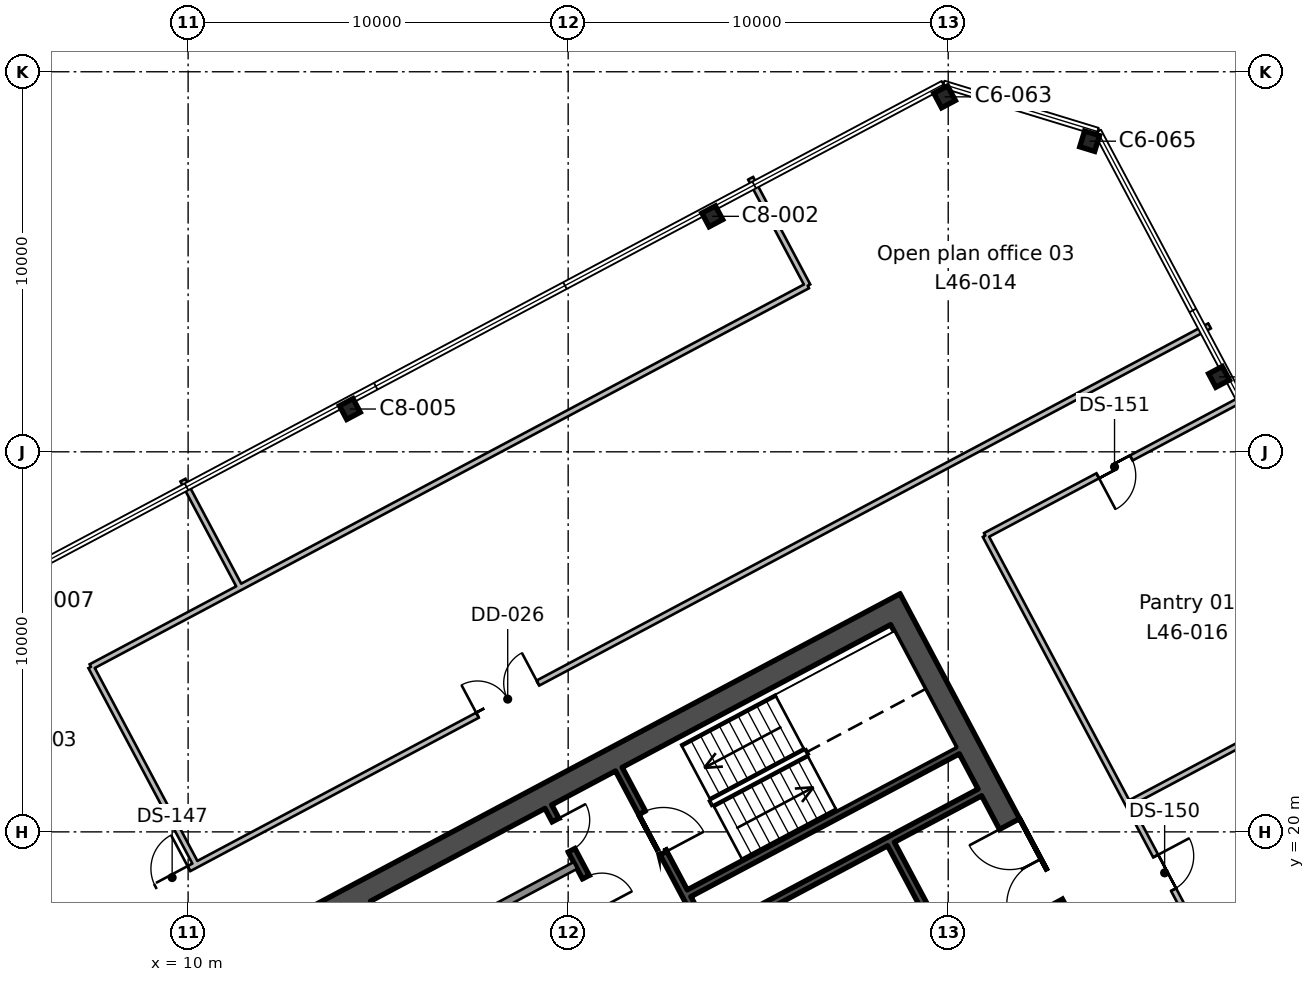
"""IFC4 building model, lengths in metres.
Left out: names, types, materials, properties, quantities, classifications, styles, units other than length and angle.
Written with IfcOpenShell. Run it as: python <this file> out.ifc"""

import sys

from ifc_helpers import new_model, si_unit, direction, frame, frame_2d, origin, origin_2d, place, context, subcontext, project, spatial, rectangle, i_section, extrude, element, fill, save


model = new_model("IFC4")
c1 = context("Model", 3, precision=1e-05, world=origin(), true_north=direction((0.0, 1.0)))
c2 = subcontext(c1, "Body", "Model", "MODEL_VIEW")
j1 = project(units=[si_unit("LENGTHUNIT", "METRE"), si_unit("PLANEANGLEUNIT", "RADIAN")], contexts=[c1])
p1 = place(None, origin())
s1 = spatial("IfcSite", under=j1, at=p1, CompositionType="ELEMENT")
p2 = place(p1, origin())
s2 = spatial("IfcBuilding", under=s1, at=p2, CompositionType="ELEMENT")
p3 = place(p2, frame((0.0, 0.0, 213.0)))
s3 = spatial("IfcBuildingStorey", under=s2, at=p3, CompositionType="ELEMENT", Elevation=213.0)
for number, where, z_axis, x_axis in (
    (1, (14.256, 31.126, 0.0), (0.0, 0.0, 1.0), (-0.883, -0.469, 0.0)),
    (2, (37.126, 31.972, 0.0), (0.0, 0.0, 1.0), (-0.469, 0.883, 0.0)),
    (3, (23.792, 36.196, 0.0), (0.0, 0.0, 1.0), (-0.883, -0.469, 0.0)),
):
    element("IfcColumn", number, at=place(p3, frame(where, z_axis=z_axis, x_axis=x_axis)), inside=s3, PredefinedType="COLUMN", context=c2, shape_type="SweptSolid", body=[
        extrude(i_section(OverallWidth=0.404, OverallDepth=0.406, WebThickness=0.027, FlangeThickness=0.044, FilletRadius=0.015, at=origin_2d()), origin(), (0.0, 0.0, 1.0), 3.9),
    ])
for number, where, z_axis, x_axis in (
    (4, (33.721, 38.173, 0.0), (0.0, 0.0, 1.0), (-0.956, 0.292, 0.0)),
    (5, (29.905, 39.34, 0.0), (0.0, 0.0, 1.0), (-0.883, -0.469, 0.0)),
):
    element("IfcColumn", number, at=place(p3, frame(where, z_axis=z_axis, x_axis=x_axis)), inside=s3, PredefinedType="COLUMN", context=c2, shape_type="SweptSolid", body=[
        extrude(i_section(OverallWidth=0.412, OverallDepth=0.434, WebThickness=0.036, FlangeThickness=0.057, FilletRadius=0.015, at=origin_2d()), origin(), (0.0, 0.0, 1.0), 3.9),
    ])
p4 = place(p3, frame((37.576, 8.994, 0.0), z_axis=(0.0, 0.0, 1.0), x_axis=(-0.469478769487, 0.88294376095, 0.0)))
e6 = element("IfcWall", 6, at=p4, inside=s3, PredefinedType="SHEAR", context=c2, shape_type="SweptSolid", body=[
    extrude(rectangle(XDim=19.4, YDim=0.6, at=frame_2d((9.7, 0.0))), origin(), (0.0, 0.0, 1.0), 3.9),
])
p5 = place(p4, frame((10.3, 0.0, 0.0)))
e7 = element("IfcOpeningElement", 7, at=p5, cuts=e6, PredefinedType="OPENING", context=c2, shape_type="SweptSolid", body=[
    extrude(rectangle(XDim=2.4, YDim=2.4, at=frame_2d((1.2, 1.2))), frame((0.0, 0.31, 0.0), z_axis=(0.0, -1.0, 0.0), x_axis=(1.0, 0.0, 0.0)), (0.0, 0.0, 1.0), 0.62),
])
p6 = place(p3, frame((10.509, 16.234, 0.0), z_axis=(0.0, 0.0, 1.0), x_axis=(0.88295010195, 0.469466843842, 0.0)))
e8 = element("IfcWall", 8, at=p6, inside=s3, PredefinedType="SHEAR", context=c2, shape_type="SweptSolid", body=[
    extrude(rectangle(XDim=20.2, YDim=0.6, at=frame_2d((10.1, 0.0))), origin(), (0.0, 0.0, 1.0), 3.9),
])
p7 = place(p3, frame((18.138, 11.683, 0.0), z_axis=(0.0, 0.0, 1.0), x_axis=(-0.469480409012, 0.88294288918, 0.0)))
e9 = element("IfcWall", 9, at=p7, inside=s3, PredefinedType="SHEAR", context=c2, shape_type="SweptSolid", body=[
    extrude(rectangle(XDim=7.3, YDim=0.2, at=frame_2d((3.65, 0.0))), origin(), (0.0, 0.0, 1.0), 3.9),
])
p8 = place(p3, frame((22.906, 14.218, 0.0), z_axis=(0.0, 0.0, 1.0), x_axis=(-0.469480409012, 0.88294288918, 0.0)))
e10 = element("IfcWall", 10, at=p8, inside=s3, PredefinedType="SHEAR", context=c2, shape_type="SweptSolid", body=[
    extrude(rectangle(XDim=7.3, YDim=0.2, at=frame_2d((3.65, 0.0))), origin(), (0.0, 0.0, 1.0), 3.9),
])
p9 = place(p8, frame((2.65, 0.0, 0.0)))
e11 = element("IfcOpeningElement", 11, at=p9, cuts=e10, PredefinedType="OPENING", context=c2, shape_type="SweptSolid", body=[
    extrude(rectangle(XDim=0.9, YDim=2.1, at=frame_2d((0.45, 1.05))), frame((0.0, 0.11, 0.0), z_axis=(0.0, -1.0, 0.0), x_axis=(1.0, 0.0, 0.0)), (0.0, 0.0, 1.0), 0.22),
])
p10 = place(p8, frame((4.3, 0.0, 0.0)))
e12 = element("IfcOpeningElement", 12, at=p10, cuts=e10, PredefinedType="OPENING", context=c2, shape_type="SweptSolid", body=[
    extrude(rectangle(XDim=0.9, YDim=2.1, at=frame_2d((0.45, 1.05))), frame((0.0, 0.11, 0.0), z_axis=(0.0, -1.0, 0.0), x_axis=(1.0, 0.0, 0.0)), (0.0, 0.0, 1.0), 0.22),
])
p11 = place(p8, frame((6.0, 0.0, 0.0)))
e13 = element("IfcOpeningElement", 13, at=p11, cuts=e10, PredefinedType="OPENING", context=c2, shape_type="SweptSolid", body=[
    extrude(rectangle(XDim=0.9, YDim=2.1, at=frame_2d((0.45, 1.05))), frame((0.0, 0.11, 0.0), z_axis=(0.0, -1.0, 0.0), x_axis=(1.0, 0.0, 0.0)), (0.0, 0.0, 1.0), 0.22),
])
p12 = place(p3, frame((24.76, 15.204, 0.0), z_axis=(0.0, 0.0, 1.0), x_axis=(-0.469494272526, 0.882935517501, 0.0)))
e14 = element("IfcWall", 14, at=p12, inside=s3, PredefinedType="SHEAR", context=c2, shape_type="SweptSolid", body=[
    extrude(rectangle(XDim=7.3, YDim=0.2, at=frame_2d((3.65, 0.0))), origin(), (0.0, 0.0, 1.0), 3.9),
])
p13 = place(p12, frame((4.8, 0.0, 0.0)))
e15 = element("IfcOpeningElement", 15, at=p13, cuts=e14, PredefinedType="OPENING", context=c2, shape_type="SweptSolid", body=[
    extrude(rectangle(XDim=1.2, YDim=2.1, at=frame_2d((0.6, 1.05))), frame((0.0, 0.11, 0.0), z_axis=(0.0, -1.0, 0.0), x_axis=(1.0, 0.0, 0.0)), (0.0, 0.0, 1.0), 0.22),
])
p14 = place(p3, frame((29.528, 17.739, 0.0), z_axis=(0.0, 0.0, 1.0), x_axis=(-0.469401318492, 0.882984938828, 0.0)))
e16 = element("IfcWall", 16, at=p14, inside=s3, PredefinedType="SHEAR", context=c2, shape_type="SweptSolid", body=[
    extrude(rectangle(XDim=2.2, YDim=0.2, at=frame_2d((1.1, 0.0))), origin(), (0.0, 0.0, 1.0), 3.9),
])
p15 = place(p3, frame((23.769, 17.282, 0.0), z_axis=(0.0, 0.0, 1.0), x_axis=(0.882940221191, 0.469485426614, 0.0)))
e17 = element("IfcWall", 17, at=p15, inside=s3, PredefinedType="SHEAR", context=c2, shape_type="SweptSolid", body=[
    extrude(rectangle(XDim=8.0, YDim=0.2, at=frame_2d((4.0, 0.0))), origin(), (0.0, 0.0, 1.0), 3.9),
])
p16 = place(p3, frame((23.182, 18.385, 0.0), z_axis=(0.0, 0.0, 1.0), x_axis=(0.88295287151, 0.469461634952, 0.0)))
e18 = element("IfcWall", 18, at=p16, inside=s3, PredefinedType="SHEAR", context=c2, shape_type="SweptSolid", body=[
    extrude(rectangle(XDim=8.0, YDim=0.2, at=frame_2d((4.0, 0.0))), origin(), (0.0, 0.0, 1.0), 3.9),
])
p17 = place(p3, frame((15.598, 16.674, 0.0), z_axis=(0.0, 0.0, 1.0), x_axis=(0.882934506056, 0.469496174655, 0.0)))
e19 = element("IfcWall", 19, at=p17, inside=s3, PredefinedType="SOLIDWALL", context=c2, shape_type="SweptSolid", body=[
    extrude(rectangle(XDim=5.2, YDim=0.2, at=frame_2d((2.6, 0.0))), origin(), (0.0, 0.0, 1.0), 3.9),
])
p18 = place(p3, frame((0.0, 13.704, 0.0), z_axis=(0.0, 0.0, 1.0), x_axis=(0.882937043325, 0.469491403036, 0.0)))
e20 = element("IfcWall", 20, at=p18, inside=s3, PredefinedType="PARTITIONING", context=c2, shape_type="SweptSolid", body=[
    extrude(rectangle(XDim=41.766, YDim=0.15, at=frame_2d((20.883, 0.0))), origin(), (0.0, 0.0, 1.0), 3.54),
])
p19 = place(p18, frame((19.95, 0.0, 0.0)))
e21 = element("IfcOpeningElement", 21, at=p19, cuts=e20, PredefinedType="OPENING", context=c2, shape_type="SweptSolid", body=[
    extrude(rectangle(XDim=1.8, YDim=2.1, at=frame_2d((0.9, 1.05))), frame((0.0, 0.085, 0.0), z_axis=(0.0, -1.0, 0.0), x_axis=(1.0, 0.0, 0.0)), (0.0, 0.0, 1.0), 0.17),
])
p20 = place(p18, frame((10.35, 0.0, 0.0)))
e22 = element("IfcOpeningElement", 22, at=p20, cuts=e20, PredefinedType="OPENING", context=c2, shape_type="SweptSolid", body=[
    extrude(rectangle(XDim=1.0, YDim=2.1, at=frame_2d((0.5, 1.05))), frame((0.0, 0.085, 0.0), z_axis=(0.0, -1.0, 0.0), x_axis=(1.0, 0.0, 0.0)), (0.0, 0.0, 1.0), 0.17),
])
p21 = place(p3, frame((9.864, 29.255, 0.0), z_axis=(0.0, 0.0, 1.0), x_axis=(0.469447181805, -0.882960556025, 0.0)))
e23 = element("IfcWall", 23, at=p21, inside=s3, PredefinedType="PARTITIONING", context=c2, shape_type="SweptSolid", body=[
    extrude(rectangle(XDim=3.199, YDim=0.15, at=frame_2d((1.6, 0.0))), origin(), (0.0, 0.0, 1.0), 3.54),
])
p22 = place(p3, frame((11.355, 26.424, 0.0), z_axis=(0.0, 0.0, 1.0), x_axis=(-0.882846627183, -0.469661402366, 0.0)))
e24 = element("IfcWall", 24, at=p22, inside=s3, PredefinedType="PARTITIONING", context=c2, shape_type="SweptSolid", body=[
    extrude(rectangle(XDim=4.431, YDim=0.15, at=frame_2d((2.215, 0.0))), origin(), (0.0, 0.0, 1.0), 3.54),
])
p23 = place(p3, frame((7.443, 24.343, 0.0), z_axis=(0.0, 0.0, 1.0), x_axis=(0.469531157267, -0.882915903332, 0.0)))
e25 = element("IfcWall", 25, at=p23, inside=s3, PredefinedType="PARTITIONING", context=c2, shape_type="SweptSolid", body=[
    extrude(rectangle(XDim=5.84, YDim=0.15, at=frame_2d((2.92, 0.0))), origin(), (0.0, 0.0, 1.0), 3.54),
])
p24 = place(p3, frame((11.355, 26.424, 0.0), z_axis=(0.0, 0.0, 1.0), x_axis=(0.882971344108, 0.469426890458, 0.0)))
e26 = element("IfcWall", 26, at=p24, inside=s3, PredefinedType="PARTITIONING", context=c2, shape_type="SweptSolid", body=[
    extrude(rectangle(XDim=16.929, YDim=0.15, at=frame_2d((8.465, 0.0))), origin(), (0.0, 0.0, 1.0), 3.54),
])
p25 = place(p3, frame((26.303, 34.371, 0.0), z_axis=(0.0, 0.0, 1.0), x_axis=(-0.46919425931, 0.883094981885, 0.0)))
e27 = element("IfcWall", 27, at=p25, inside=s3, PredefinedType="PARTITIONING", context=c2, shape_type="SweptSolid", body=[
    extrude(rectangle(XDim=3.201, YDim=0.15, at=frame_2d((1.601, 0.0))), origin(), (0.0, 0.0, 1.0), 3.54),
])
p26 = place(p3, frame((37.864, 31.458, 0.0), z_axis=(0.0, 0.0, 1.0), x_axis=(-0.882962098673, -0.4694442803, 0.0)))
e28 = element("IfcWall", 28, at=p26, inside=s3, PredefinedType="PARTITIONING", context=c2, shape_type="SweptSolid", body=[
    extrude(rectangle(XDim=7.801, YDim=0.15, at=frame_2d((3.9, 0.0))), origin(), (0.0, 0.0, 1.0), 3.54),
])
p27 = place(p26, frame((3.45, 0.0, 0.0)))
e29 = element("IfcOpeningElement", 29, at=p27, cuts=e28, PredefinedType="OPENING", context=c2, shape_type="SweptSolid", body=[
    extrude(rectangle(XDim=1.0, YDim=2.1, at=frame_2d((0.5, 1.05))), frame((0.0, 0.085, 0.0), z_axis=(0.0, -1.0, 0.0), x_axis=(1.0, 0.0, 0.0)), (0.0, 0.0, 1.0), 0.17),
])
p28 = place(p3, frame((30.976, 27.796, 0.0), z_axis=(0.0, 0.0, 1.0), x_axis=(0.469489882812, -0.882937851685, 0.0)))
e30 = element("IfcWall", 30, at=p28, inside=s3, PredefinedType="PARTITIONING", context=c2, shape_type="SweptSolid", body=[
    extrude(rectangle(XDim=20.0, YDim=0.15, at=frame_2d((10.0, 0.0))), origin(), (0.0, 0.0, 1.0), 3.54),
])
p29 = place(p28, frame((9.55, 0.0, 0.0)))
e31 = element("IfcOpeningElement", 31, at=p29, cuts=e30, PredefinedType="OPENING", context=c2, shape_type="SweptSolid", body=[
    extrude(rectangle(XDim=1.0, YDim=2.1, at=frame_2d((0.5, 1.05))), frame((0.0, 0.085, 0.0), z_axis=(0.0, -1.0, 0.0), x_axis=(1.0, 0.0, 0.0)), (0.0, 0.0, 1.0), 0.17),
])
p30 = place(p3, frame((41.619, 24.395, 0.0), z_axis=(0.0, 0.0, 1.0), x_axis=(-0.882882604432, -0.469593767837, 0.0)))
e32 = element("IfcWall", 32, at=p30, inside=s3, PredefinedType="PARTITIONING", context=c2, shape_type="SweptSolid", body=[
    extrude(rectangle(XDim=7.801, YDim=0.15, at=frame_2d((3.9, 0.0))), origin(), (0.0, 0.0, 1.0), 3.54),
])
p31 = place(p5, origin())
e33 = element("IfcDoor", 33, at=p31, inside=s3, OperationType="DOUBLE_DOOR_SINGLE_SWING", PredefinedType="DOOR", context=c2, shape_type="SweptSolid", body=[
    extrude(rectangle(XDim=2.4, YDim=2.4, at=frame_2d((1.2, 1.2))), frame((0.0, 0.025, 0.0), z_axis=(0.0, -1.0, 0.0), x_axis=(1.0, 0.0, 0.0)), (0.0, 0.0, 1.0), 0.05),
])
fill(e7, e33)
p32 = place(p13, frame((1.2, 0.0, 0.0), z_axis=(0.0, 0.0, 1.0), x_axis=(-1.0, 0.0, 0.0)))
e34 = element("IfcDoor", 34, at=p32, inside=s3, OperationType="SINGLE_SWING_RIGHT", PredefinedType="DOOR", context=c2, shape_type="SweptSolid", body=[
    extrude(rectangle(XDim=1.2, YDim=2.1, at=frame_2d((0.6, 1.05))), frame((0.0, 0.025, 0.0), z_axis=(0.0, -1.0, 0.0), x_axis=(1.0, 0.0, 0.0)), (0.0, 0.0, 1.0), 0.05),
])
fill(e15, e34)
p33 = place(p10, frame((0.9, 0.0, 0.0), z_axis=(0.0, 0.0, 1.0), x_axis=(-1.0, 0.0, 0.0)))
e35 = element("IfcDoor", 35, at=p33, inside=s3, OperationType="SINGLE_SWING_RIGHT", PredefinedType="DOOR", context=c2, shape_type="SweptSolid", body=[
    extrude(rectangle(XDim=0.9, YDim=2.1, at=frame_2d((0.45, 1.05))), frame((0.0, 0.025, 0.0), z_axis=(0.0, -1.0, 0.0), x_axis=(1.0, 0.0, 0.0)), (0.0, 0.0, 1.0), 0.05),
])
fill(e12, e35)
p34 = place(p11, frame((0.9, 0.0, 0.0), z_axis=(0.0, 0.0, 1.0), x_axis=(-1.0, 0.0, 0.0)))
e36 = element("IfcDoor", 36, at=p34, inside=s3, OperationType="SINGLE_SWING_LEFT", PredefinedType="DOOR", context=c2, shape_type="SweptSolid", body=[
    extrude(rectangle(XDim=0.9, YDim=2.1, at=frame_2d((0.45, 1.05))), frame((0.0, 0.025, 0.0), z_axis=(0.0, -1.0, 0.0), x_axis=(1.0, 0.0, 0.0)), (0.0, 0.0, 1.0), 0.05),
])
fill(e13, e36)
p35 = place(p19, origin())
e37 = element("IfcDoor", 37, at=p35, inside=s3, OperationType="DOUBLE_DOOR_SINGLE_SWING", PredefinedType="DOOR", context=c2, shape_type="SweptSolid", body=[
    extrude(rectangle(XDim=1.8, YDim=2.1, at=frame_2d((0.9, 1.05))), frame((0.0, 0.025, 0.0), z_axis=(0.0, -1.0, 0.0), x_axis=(1.0, 0.0, 0.0)), (0.0, 0.0, 1.0), 0.05),
])
fill(e21, e37)
p36 = place(p20, origin())
e38 = element("IfcDoor", 38, at=p36, inside=s3, OperationType="SINGLE_SWING_RIGHT", PredefinedType="DOOR", context=c2, shape_type="SweptSolid", body=[
    extrude(rectangle(XDim=1.0, YDim=2.1, at=frame_2d((0.5, 1.05))), frame((0.0, 0.025, 0.0), z_axis=(0.0, -1.0, 0.0), x_axis=(1.0, 0.0, 0.0)), (0.0, 0.0, 1.0), 0.05),
])
fill(e22, e38)
p37 = place(p29, origin())
e39 = element("IfcDoor", 39, at=p37, inside=s3, OperationType="SINGLE_SWING_LEFT", PredefinedType="DOOR", context=c2, shape_type="SweptSolid", body=[
    extrude(rectangle(XDim=1.0, YDim=2.1, at=frame_2d((0.5, 1.05))), frame((0.0, 0.025, 0.0), z_axis=(0.0, -1.0, 0.0), x_axis=(1.0, 0.0, 0.0)), (0.0, 0.0, 1.0), 0.05),
])
fill(e31, e39)
p38 = place(p27, origin())
e40 = element("IfcDoor", 40, at=p38, inside=s3, OperationType="SINGLE_SWING_RIGHT", PredefinedType="DOOR", context=c2, shape_type="SweptSolid", body=[
    extrude(rectangle(XDim=1.0, YDim=2.1, at=frame_2d((0.5, 1.05))), frame((0.0, 0.025, 0.0), z_axis=(0.0, -1.0, 0.0), x_axis=(1.0, 0.0, 0.0)), (0.0, 0.0, 1.0), 0.05),
])
fill(e29, e40)
save(model, sys.argv[1])
